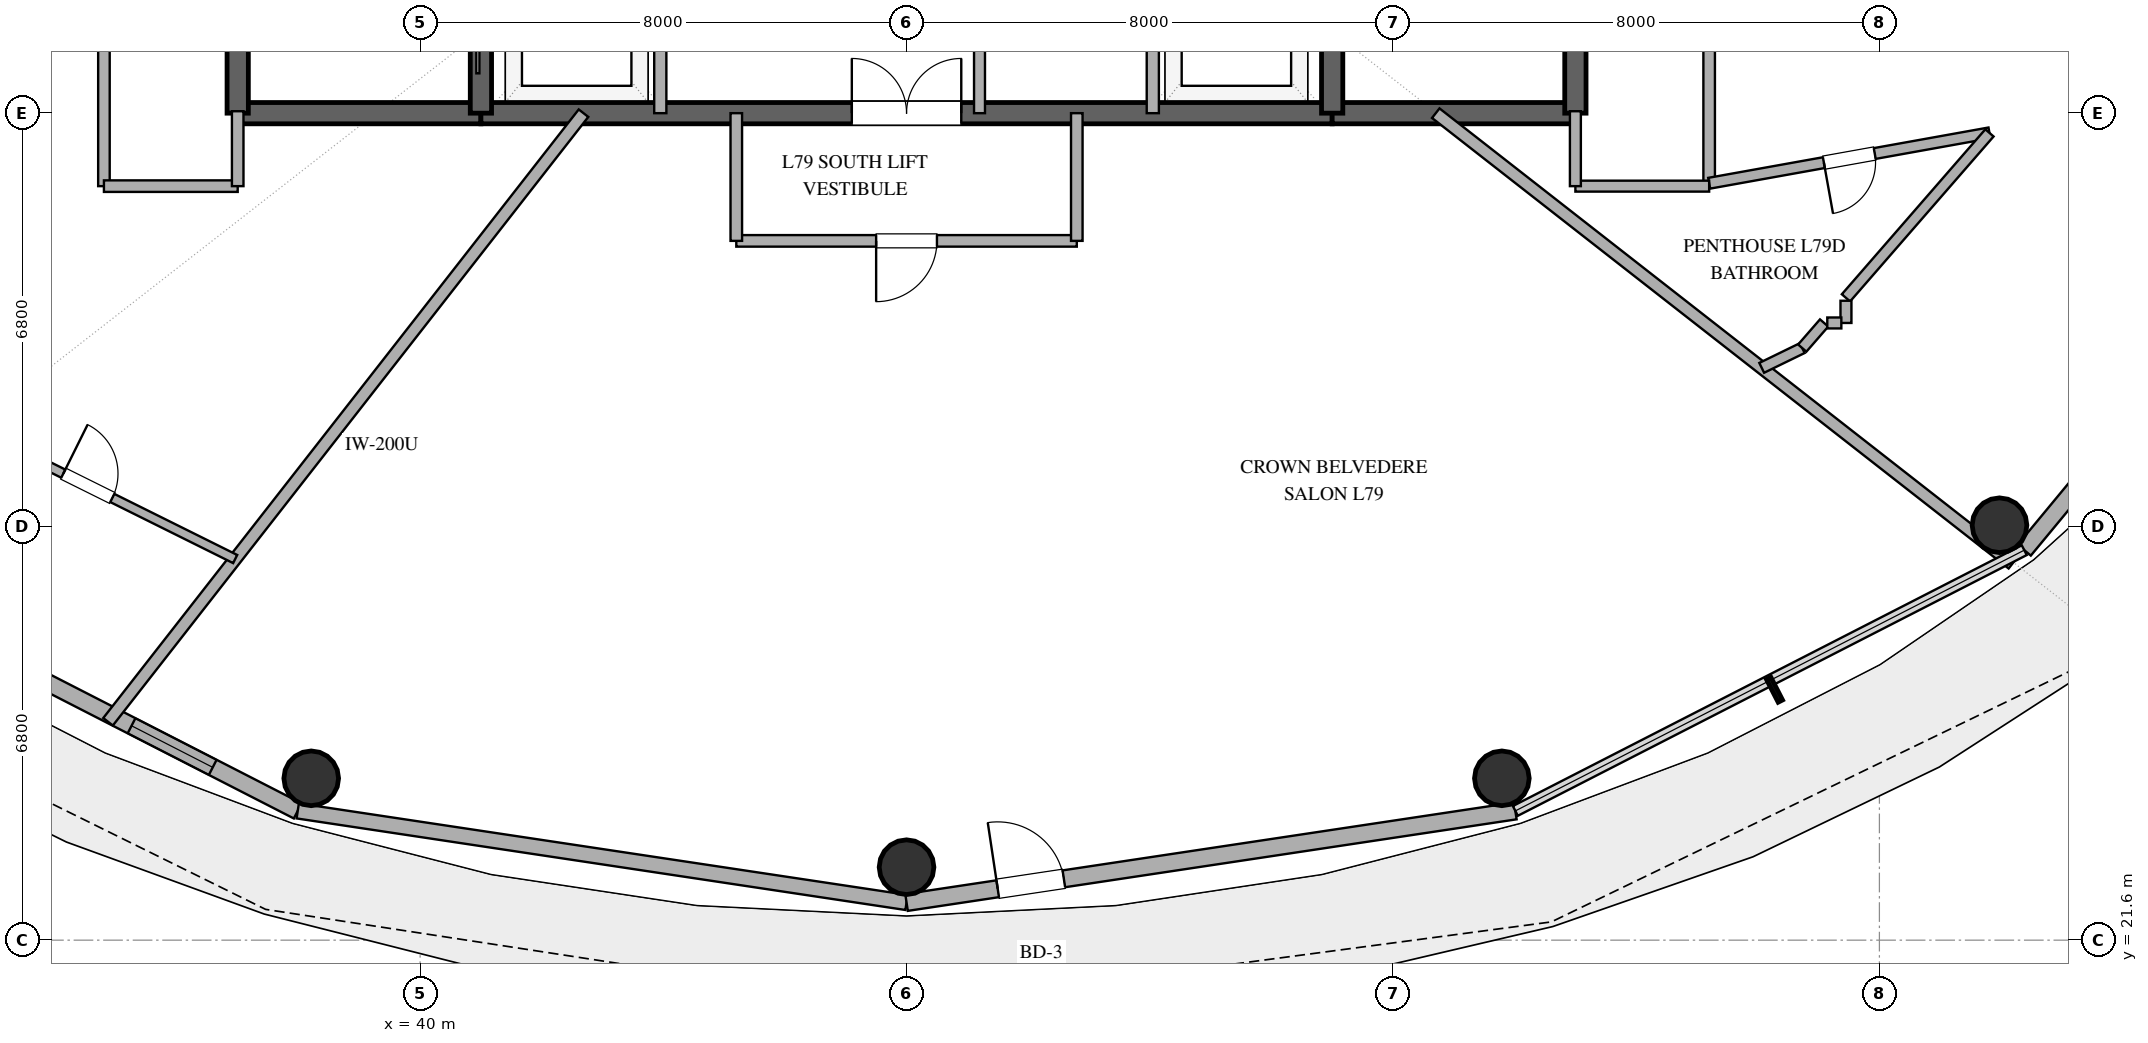
"""IFC4 building model, lengths in metres.
Left out: names, types, materials, properties, quantities, classifications, styles, units other than length and angle.
Written with IfcOpenShell. Run it as: python <this file> out.ifc"""

import sys

from ifc_helpers import new_model, si_unit, direction, frame, frame_2d, origin, origin_2d, place, context, subcontext, project, spatial, rectangle, hollow_circle, extrude, element, fill, save


model = new_model("IFC4")
c1 = context("Model", 3, precision=1e-05, world=origin(), true_north=direction((0.0, 1.0)))
c2 = subcontext(c1, "Body", "Model", "MODEL_VIEW")
j1 = project(units=[si_unit("LENGTHUNIT", "METRE"), si_unit("PLANEANGLEUNIT", "RADIAN")], contexts=[c1])
p1 = place(None, origin())
s1 = spatial("IfcSite", under=j1, at=p1, CompositionType="ELEMENT")
p2 = place(p1, origin())
s2 = spatial("IfcBuilding", under=s1, at=p2, CompositionType="ELEMENT")
p3 = place(p2, frame((0.0, 0.0, 305.4)))
s3 = spatial("IfcBuildingStorey", under=s2, at=p3, CompositionType="ELEMENT", Elevation=305.4)
p4 = place(p3, frame((37.0, 35.2, 0.0), z_axis=(0.0, 0.0, 1.0), x_axis=(1.0, 0.0, 0.0)))
e1 = element("IfcWall", 1, at=p4, inside=s3, PredefinedType="SHEAR", context=c2, shape_type="SweptSolid", body=[
    extrude(rectangle(XDim=4.0, YDim=0.35, at=frame_2d((2.0, 0.0))), origin(), (0.0, 0.0, 1.0), 3.37),
])
p5 = place(p3, frame((41.0, 35.2, 0.0), z_axis=(0.0, 0.0, 1.0), x_axis=(1.0, 0.0, 0.0)))
e2 = element("IfcWall", 2, at=p5, inside=s3, PredefinedType="SHEAR", context=c2, shape_type="SweptSolid", body=[
    extrude(rectangle(XDim=14.0, YDim=0.35, at=frame_2d((7.0, 0.0))), origin(), (0.0, 0.0, 1.0), 3.37),
])
p6 = place(p5, frame((6.1, 0.0, 0.0)))
e3 = element("IfcOpeningElement", 3, at=p6, cuts=e2, PredefinedType="OPENING", context=c2, shape_type="SweptSolid", body=[
    extrude(rectangle(XDim=1.8, YDim=2.25, at=frame_2d((0.9, 1.125))), frame((0.0, 0.185, 0.0), z_axis=(0.0, -1.0, 0.0), x_axis=(1.0, 0.0, 0.0)), (0.0, 0.0, 1.0), 0.37),
])
p7 = place(p3, frame((55.0, 35.2, 0.0), z_axis=(0.0, 0.0, 1.0), x_axis=(1.0, 0.0, 0.0)))
e4 = element("IfcWall", 4, at=p7, inside=s3, PredefinedType="SHEAR", context=c2, shape_type="SweptSolid", body=[
    extrude(rectangle(XDim=4.0, YDim=0.35, at=frame_2d((2.0, 0.0))), origin(), (0.0, 0.0, 1.0), 3.37),
])
p8 = place(p3, frame((37.0, 35.2, 0.0), z_axis=(0.0, 0.0, 1.0), x_axis=(0.0, 1.0, 0.0)))
e5 = element("IfcWall", 5, at=p8, inside=s3, PredefinedType="SHEAR", context=c2, shape_type="SweptSolid", body=[
    extrude(rectangle(XDim=13.6, YDim=0.35, at=frame_2d((6.8, 0.0))), origin(), (0.0, 0.0, 1.0), 3.37),
])
p9 = place(p8, frame((1.5, 0.0, 0.0)))
e6 = element("IfcOpeningElement", 6, at=p9, cuts=e5, PredefinedType="OPENING", context=c2, shape_type="SweptSolid", body=[
    extrude(rectangle(XDim=1.2, YDim=2.15, at=frame_2d((0.6, 1.075))), frame((0.0, 0.185, 0.0), z_axis=(0.0, -1.0, 0.0), x_axis=(1.0, 0.0, 0.0)), (0.0, 0.0, 1.0), 0.37),
])
p10 = place(p3, frame((59.0, 35.2, 0.0), z_axis=(0.0, 0.0, 1.0), x_axis=(0.0, 1.0, 0.0)))
e7 = element("IfcWall", 7, at=p10, inside=s3, PredefinedType="SHEAR", context=c2, shape_type="SweptSolid", body=[
    extrude(rectangle(XDim=13.6, YDim=0.35, at=frame_2d((6.8, 0.0))), origin(), (0.0, 0.0, 1.0), 3.37),
])
p11 = place(p10, frame((1.5, 0.0, 0.0)))
e8 = element("IfcOpeningElement", 8, at=p11, cuts=e7, PredefinedType="OPENING", context=c2, shape_type="SweptSolid", body=[
    extrude(rectangle(XDim=1.2, YDim=2.15, at=frame_2d((0.6, 1.075))), frame((0.0, 0.185, 0.0), z_axis=(0.0, -1.0, 0.0), x_axis=(1.0, 0.0, 0.0)), (0.0, 0.0, 1.0), 0.37),
])
p12 = place(p3, frame((41.0, 35.2, 0.0), z_axis=(0.0, 0.0, 1.0), x_axis=(0.0, 1.0, 0.0)))
e9 = element("IfcWall", 9, at=p12, inside=s3, PredefinedType="SHEAR", context=c2, shape_type="SweptSolid", body=[
    extrude(rectangle(XDim=13.6, YDim=0.35, at=frame_2d((6.8, 0.0))), origin(), (0.0, 0.0, 1.0), 3.37),
])
p13 = place(p12, frame((1.15, 0.0, 0.0)))
e10 = element("IfcOpeningElement", 10, at=p13, cuts=e9, PredefinedType="OPENING", context=c2, shape_type="SweptSolid", body=[
    extrude(rectangle(XDim=1.1, YDim=2.2, at=frame_2d((0.55, 1.1))), frame((0.0, 0.185, 0.0), z_axis=(0.0, -1.0, 0.0), x_axis=(1.0, 0.0, 0.0)), (0.0, 0.0, 1.0), 0.37),
])
p14 = place(p3, frame((55.0, 35.2, 0.0), z_axis=(0.0, 0.0, 1.0), x_axis=(0.0, 1.0, 0.0)))
e11 = element("IfcWall", 11, at=p14, inside=s3, PredefinedType="SHEAR", context=c2, shape_type="SweptSolid", body=[
    extrude(rectangle(XDim=13.6, YDim=0.35, at=frame_2d((6.8, 0.0))), origin(), (0.0, 0.0, 1.0), 3.37),
])
p15 = place(p14, frame((1.15, 0.0, 0.0)))
e12 = element("IfcOpeningElement", 12, at=p15, cuts=e11, PredefinedType="OPENING", context=c2, shape_type="SweptSolid", body=[
    extrude(rectangle(XDim=1.1, YDim=2.2, at=frame_2d((0.55, 1.1))), frame((0.0, 0.185, 0.0), z_axis=(0.0, -1.0, 0.0), x_axis=(1.0, 0.0, 0.0)), (0.0, 0.0, 1.0), 0.37),
])
for number, where, z_axis, x_axis in (
    (13, (38.209, 24.261, 0.0), (0.0, 0.0, 1.0), (1.0, 0.0, 0.0)),
    (14, (48.0, 22.8, 0.0), (0.0, 0.0, 1.0), (1.0, 0.0, 0.0)),
    (15, (57.791, 24.261, 0.0), (0.0, 0.0, 1.0), (1.0, 0.0, 0.0)),
    (16, (65.975, 28.424, 0.0), (0.0, 0.0, 1.0), (1.0, 0.0, 0.0)),
):
    element("IfcColumn", number, at=place(p3, frame(where, z_axis=z_axis, x_axis=x_axis)), inside=s3, PredefinedType="COLUMN", context=c2, shape_type="SweptSolid", body=[
        extrude(hollow_circle(Radius=0.45, WallThickness=0.025, at=origin_2d()), origin(), (0.0, 0.0, 1.0), 3.37),
    ])
p16 = place(p3, frame((29.617, 28.013, 0.0), z_axis=(0.0, 0.0, 1.0), x_axis=(0.890007394051, -0.455946091699, 0.0)))
e17 = element("IfcWall", 17, at=p16, inside=s3, PredefinedType="SOLIDWALL", context=c2, shape_type="SweptSolid", body=[
    extrude(rectangle(XDim=9.404, YDim=0.28, at=frame_2d((4.702, 0.0))), origin(), (0.0, 0.0, 1.0), 3.37),
])
p17 = place(p16, frame((2.817, 0.0, 0.85)))
e18 = element("IfcOpeningElement", 18, at=p17, cuts=e17, PredefinedType="OPENING", context=c2, shape_type="SweptSolid", body=[
    extrude(rectangle(XDim=1.65, YDim=2.0, at=frame_2d((0.825, 1.0))), frame((0.0, 0.15, 0.0), z_axis=(0.0, -1.0, 0.0), x_axis=(1.0, 0.0, 0.0)), (0.0, 0.0, 1.0), 0.3),
])
p18 = place(p16, frame((6.333, 0.0, 0.85)))
e19 = element("IfcOpeningElement", 19, at=p18, cuts=e17, PredefinedType="OPENING", context=c2, shape_type="SweptSolid", body=[
    extrude(rectangle(XDim=1.5, YDim=2.0, at=frame_2d((0.75, 1.0))), frame((0.0, 0.15, 0.0), z_axis=(0.0, -1.0, 0.0), x_axis=(1.0, 0.0, 0.0)), (0.0, 0.0, 1.0), 0.3),
])
p19 = place(p3, frame((37.987, 23.726, 0.0), z_axis=(0.0, 0.0, 1.0), x_axis=(0.988882522213, -0.148698881169, 0.0)))
e20 = element("IfcWall", 20, at=p19, inside=s3, PredefinedType="SOLIDWALL", context=c2, shape_type="SweptSolid", body=[
    extrude(rectangle(XDim=10.125, YDim=0.25, at=frame_2d((5.062, 0.0))), origin(), (0.0, 0.0, 1.0), 3.37),
])
p20 = place(p3, frame((48.0, 22.22, 0.0), z_axis=(0.0, 0.0, 1.0), x_axis=(0.988882522213, 0.148698881169, 0.0)))
e21 = element("IfcWall", 21, at=p20, inside=s3, PredefinedType="SOLIDWALL", context=c2, shape_type="SweptSolid", body=[
    extrude(rectangle(XDim=10.125, YDim=0.28, at=frame_2d((5.062, 0.0))), origin(), (0.0, 0.0, 1.0), 3.37),
])
p21 = place(p20, frame((1.516, 0.0, 0.0)))
e22 = element("IfcOpeningElement", 22, at=p21, cuts=e21, PredefinedType="OPENING", context=c2, shape_type="SweptSolid", body=[
    extrude(rectangle(XDim=1.1, YDim=2.25, at=frame_2d((0.55, 1.125))), frame((0.0, 0.15, 0.0), z_axis=(0.0, -1.0, 0.0), x_axis=(1.0, 0.0, 0.0)), (0.0, 0.0, 1.0), 0.3),
])
p22 = place(p3, frame((66.383, 28.013, 0.0), z_axis=(0.0, 0.0, 1.0), x_axis=(0.63761509934, 0.770355103243, 0.0)))
e23 = element("IfcWall", 23, at=p22, inside=s3, PredefinedType="SOLIDWALL", context=c2, shape_type="SweptSolid", body=[
    extrude(rectangle(XDim=8.33, YDim=0.28, at=frame_2d((4.165, 0.0))), origin(), (0.0, 0.0, 1.0), 3.37),
])
p23 = place(p22, frame((2.426, 0.0, 0.85)))
e24 = element("IfcOpeningElement", 24, at=p23, cuts=e23, PredefinedType="OPENING", context=c2, shape_type="SweptSolid", body=[
    extrude(rectangle(XDim=1.2, YDim=1.8, at=frame_2d((0.6, 0.9))), frame((0.0, 0.15, 0.0), z_axis=(0.0, -1.0, 0.0), x_axis=(1.0, 0.0, 0.0)), (0.0, 0.0, 1.0), 0.3),
])
p24 = place(p22, frame((4.596, 0.0, 0.85)))
e25 = element("IfcOpeningElement", 25, at=p24, cuts=e23, PredefinedType="OPENING", context=c2, shape_type="SweptSolid", body=[
    extrude(rectangle(XDim=1.2, YDim=1.8, at=frame_2d((0.6, 0.9))), frame((0.0, 0.15, 0.0), z_axis=(0.0, -1.0, 0.0), x_axis=(1.0, 0.0, 0.0)), (0.0, 0.0, 1.0), 0.3),
])
for number, where, z_axis, x_axis in (
    (26, (43.95, 35.2, 0.0), (0.0, 0.0, 1.0), (0.0, 1.0, 0.0)),
    (27, (52.05, 35.2, 0.0), (0.0, 0.0, 1.0), (0.0, 1.0, 0.0)),
):
    element("IfcWall", number, at=place(p3, frame(where, z_axis=z_axis, x_axis=x_axis)), inside=s3, PredefinedType="SOLIDWALL", context=c2, shape_type="SweptSolid", body=[
        extrude(rectangle(XDim=3.2, YDim=0.2, at=frame_2d((1.6, 0.0))), origin(), (0.0, 0.0, 1.0), 2.73),
    ])
p25 = place(p3, frame((49.2, 35.2, 0.0), z_axis=(0.0, 0.0, 1.0), x_axis=(0.0, 1.0, 0.0)))
e28 = element("IfcWall", 28, at=p25, inside=s3, PredefinedType="PLUMBINGWALL", context=c2, shape_type="SweptSolid", body=[
    extrude(rectangle(XDim=3.2, YDim=0.18, at=frame_2d((1.6, 0.0))), origin(), (0.0, 0.0, 1.0), 2.73),
])
p26 = place(p25, frame((1.15, 0.0, 0.0)))
e29 = element("IfcOpeningElement", 29, at=p26, cuts=e28, PredefinedType="OPENING", context=c2, shape_type="SweptSolid", body=[
    extrude(rectangle(XDim=0.9, YDim=2.1, at=frame_2d((0.45, 1.05))), frame((0.0, 0.1, 0.0), z_axis=(0.0, -1.0, 0.0), x_axis=(1.0, 0.0, 0.0)), (0.0, 0.0, 1.0), 0.2),
])
p27 = place(p3, frame((61.2, 50.9, 0.0), z_axis=(0.0, 0.0, 1.0), x_axis=(0.0, -1.0, 0.0)))
e30 = element("IfcWall", 30, at=p27, inside=s3, PredefinedType="PARTITIONING", context=c2, shape_type="SweptSolid", body=[
    extrude(rectangle(XDim=16.885, YDim=0.19, at=frame_2d((8.442, 0.0))), origin(), (0.0, 0.0, 1.0), 2.73),
])
p28 = place(p27, frame((7.942, 0.0, 0.0)))
e31 = element("IfcOpeningElement", 31, at=p28, cuts=e30, PredefinedType="OPENING", context=c2, shape_type="SweptSolid", body=[
    extrude(rectangle(XDim=1.0, YDim=2.2, at=frame_2d((0.5, 1.1))), frame((0.0, 0.105, 0.0), z_axis=(0.0, -1.0, 0.0), x_axis=(1.0, 0.0, 0.0)), (0.0, 0.0, 1.0), 0.21),
])
p29 = place(p3, frame((42.687, 35.2, 0.0), z_axis=(0.0, 0.0, 1.0), x_axis=(-0.615663811723, -0.788008928208, 0.0)))
e32 = element("IfcWall", 32, at=p29, inside=s3, PredefinedType="PARTITIONING", context=c2, shape_type="SweptSolid", body=[
    extrude(rectangle(XDim=12.701, YDim=0.2, at=frame_2d((6.351, 0.0))), origin(), (0.0, 0.0, 1.0), 2.73),
])
p30 = place(p3, frame((56.704, 35.2, 0.0), z_axis=(0.0, 0.0, 1.0), x_axis=(0.78802314347, -0.615645616695, 0.0)))
e33 = element("IfcWall", 33, at=p30, inside=s3, PredefinedType="PARTITIONING", context=c2, shape_type="SweptSolid", body=[
    extrude(rectangle(XDim=12.034, YDim=0.2, at=frame_2d((6.017, 0.0))), origin(), (0.0, 0.0, 1.0), 2.73),
])
p31 = place(p3, frame((50.8, 33.1, 0.0), z_axis=(0.0, 0.0, 1.0), x_axis=(-1.0, 0.0, 0.0)))
e34 = element("IfcWall", 34, at=p31, inside=s3, PredefinedType="PARTITIONING", context=c2, shape_type="SweptSolid", body=[
    extrude(rectangle(XDim=5.6, YDim=0.19, at=frame_2d((2.8, 0.0))), origin(), (0.0, 0.0, 1.0), 2.73),
])
p32 = place(p31, frame((2.3, 0.0, 0.0)))
e35 = element("IfcOpeningElement", 35, at=p32, cuts=e34, PredefinedType="OPENING", context=c2, shape_type="SweptSolid", body=[
    extrude(rectangle(XDim=1.0, YDim=2.2, at=frame_2d((0.5, 1.1))), frame((0.0, 0.105, 0.0), z_axis=(0.0, -1.0, 0.0), x_axis=(1.0, 0.0, 0.0)), (0.0, 0.0, 1.0), 0.21),
])
p33 = place(p3, frame((32.11, 30.276, 0.0), z_axis=(0.0, 0.0, 1.0), x_axis=(0.895587674753, -0.444885060247, 0.0)))
e36 = element("IfcWall", 36, at=p33, inside=s3, PredefinedType="PARTITIONING", context=c2, shape_type="SweptSolid", body=[
    extrude(rectangle(XDim=5.414, YDim=0.15, at=frame_2d((2.707, 0.0))), origin(), (0.0, 0.0, 1.0), 2.73),
])
p34 = place(p33, frame((2.257, 0.0, 0.0)))
e37 = element("IfcOpeningElement", 37, at=p34, cuts=e36, PredefinedType="OPENING", context=c2, shape_type="SweptSolid", body=[
    extrude(rectangle(XDim=0.9, YDim=2.1, at=frame_2d((0.45, 1.05))), frame((0.0, 0.085, 0.0), z_axis=(0.0, -1.0, 0.0), x_axis=(1.0, 0.0, 0.0)), (0.0, 0.0, 1.0), 0.17),
])
p35 = place(p3, frame((65.81, 34.875, 0.0), z_axis=(0.0, 0.0, 1.0), x_axis=(-0.984255399889, -0.1767521083, 0.0)))
e38 = element("IfcWall", 38, at=p35, inside=s3, PredefinedType="PLUMBINGWALL", context=c2, shape_type="SweptSolid", body=[
    extrude(rectangle(XDim=4.684, YDim=0.18, at=frame_2d((2.342, 0.0))), origin(), (0.0, 0.0, 1.0), 2.73),
])
p36 = place(p35, frame((1.917, 0.0, 0.0)))
e39 = element("IfcOpeningElement", 39, at=p36, cuts=e38, PredefinedType="OPENING", context=c2, shape_type="SweptSolid", body=[
    extrude(rectangle(XDim=0.85, YDim=2.1, at=frame_2d((0.425, 1.05))), frame((0.0, 0.1, 0.0), z_axis=(0.0, -1.0, 0.0), x_axis=(1.0, 0.0, 0.0)), (0.0, 0.0, 1.0), 0.2),
])
p37 = place(p3, frame((34.8, 34.0, 0.0), z_axis=(0.0, 0.0, 1.0), x_axis=(0.0, 1.0, 0.0)))
e40 = element("IfcWall", 40, at=p37, inside=s3, PredefinedType="PARTITIONING", context=c2, shape_type="SweptSolid", body=[
    extrude(rectangle(XDim=3.728, YDim=0.19, at=frame_2d((1.864, 0.0))), origin(), (0.0, 0.0, 1.0), 2.73),
])
p38 = place(p3, frame((63.45, 32.163, 0.0), z_axis=(0.0, 0.0, 1.0), x_axis=(0.656415720833, 0.754399364689, 0.0)))
e41 = element("IfcWall", 41, at=p38, inside=s3, PredefinedType="PLUMBINGWALL", context=c2, shape_type="SweptSolid", body=[
    extrude(rectangle(XDim=3.595, YDim=0.18, at=frame_2d((1.798, 0.0))), origin(), (0.0, 0.0, 1.0), 2.73),
])
p39 = place(p3, frame((37.0, 34.0, 0.0), z_axis=(0.0, 0.0, 1.0), x_axis=(-1.0, 0.0, 0.0)))
e42 = element("IfcWall", 42, at=p39, inside=s3, PredefinedType="PARTITIONING", context=c2, shape_type="SweptSolid", body=[
    extrude(rectangle(XDim=2.2, YDim=0.19, at=frame_2d((1.1, 0.0))), origin(), (0.0, 0.0, 1.0), 2.73),
])
p40 = place(p3, frame((61.2, 34.0, 0.0), z_axis=(0.0, 0.0, 1.0), x_axis=(-1.0, 0.0, 0.0)))
e43 = element("IfcWall", 43, at=p40, inside=s3, PredefinedType="PLUMBINGWALL", context=c2, shape_type="SweptSolid", body=[
    extrude(rectangle(XDim=2.2, YDim=0.18, at=frame_2d((1.1, 0.0))), origin(), (0.0, 0.0, 1.0), 2.73),
])
for number, where, z_axis, x_axis in (
    (44, (50.8, 35.2, 0.0), (0.0, 0.0, 1.0), (0.0, -1.0, 0.0)),
    (45, (45.2, 33.1, 0.0), (0.0, 0.0, 1.0), (0.0, 1.0, 0.0)),
):
    element("IfcWall", number, at=place(p3, frame(where, z_axis=z_axis, x_axis=x_axis)), inside=s3, PredefinedType="PARTITIONING", context=c2, shape_type="SweptSolid", body=[
        extrude(rectangle(XDim=2.1, YDim=0.19, at=frame_2d((1.05, 0.0))), origin(), (0.0, 0.0, 1.0), 2.73),
    ])
p41 = place(p3, frame((37.0, 35.232, 0.0), z_axis=(0.0, 0.0, 1.0), x_axis=(0.0, -1.0, 0.0)))
e46 = element("IfcWall", 46, at=p41, inside=s3, PredefinedType="PARTITIONING", context=c2, shape_type="SweptSolid", body=[
    extrude(rectangle(XDim=1.232, YDim=0.19, at=frame_2d((0.616, 0.0))), origin(), (0.0, 0.0, 1.0), 2.73),
])
p42 = place(p3, frame((59.0, 34.0, 0.0), z_axis=(0.0, 0.0, 1.0), x_axis=(0.0, 1.0, 0.0)))
e47 = element("IfcWall", 47, at=p42, inside=s3, PredefinedType="PLUMBINGWALL", context=c2, shape_type="SweptSolid", body=[
    extrude(rectangle(XDim=1.232, YDim=0.18, at=frame_2d((0.616, 0.0))), origin(), (0.0, 0.0, 1.0), 2.73),
])
p43 = place(p3, frame((62.064, 31.012, 0.0), z_axis=(0.0, 0.0, 1.0), x_axis=(0.898856964529, 0.438242121798, 0.0)))
e48 = element("IfcWall", 48, at=p43, inside=s3, PredefinedType="PLUMBINGWALL", context=c2, shape_type="SweptSolid", body=[
    extrude(rectangle(XDim=0.742, YDim=0.18, at=frame_2d((0.371, 0.0))), origin(), (0.0, 0.0, 1.0), 2.73),
])
p44 = place(p3, frame((62.731, 31.337, 0.0), z_axis=(0.0, 0.0, 1.0), x_axis=(0.656609016673, 0.754231131168, 0.0)))
e49 = element("IfcWall", 49, at=p44, inside=s3, PredefinedType="PLUMBINGWALL", context=c2, shape_type="SweptSolid", body=[
    extrude(rectangle(XDim=0.548, YDim=0.18, at=frame_2d((0.274, 0.0))), origin(), (0.0, 0.0, 1.0), 2.73),
])
p45 = place(p3, frame((63.45, 31.75, 0.0), z_axis=(0.0, 0.0, 1.0), x_axis=(0.0, 1.0, 0.0)))
e50 = element("IfcWall", 50, at=p45, inside=s3, PredefinedType="PLUMBINGWALL", context=c2, shape_type="SweptSolid", body=[
    extrude(rectangle(XDim=0.365, YDim=0.18, at=frame_2d((0.183, 0.0))), origin(), (0.0, 0.0, 1.0), 2.73),
])
p46 = place(p3, frame((63.143, 31.75, 0.0), z_axis=(0.0, 0.0, 1.0), x_axis=(1.0, 0.0, 0.0)))
e51 = element("IfcWall", 51, at=p46, inside=s3, PredefinedType="PLUMBINGWALL", context=c2, shape_type="SweptSolid", body=[
    extrude(rectangle(XDim=0.231, YDim=0.18, at=frame_2d((0.116, 0.0))), origin(), (0.0, 0.0, 1.0), 2.73),
])
p47 = place(p18, origin())
e52 = element("IfcWindow", 52, at=p47, inside=s3, PartitioningType="SINGLE_PANEL", PredefinedType="WINDOW", context=c2, shape_type="SweptSolid", body=[
    extrude(rectangle(XDim=1.5, YDim=2.0, at=frame_2d((0.75, 1.0))), frame((0.0, 0.03, 0.0), z_axis=(0.0, -1.0, 0.0), x_axis=(1.0, 0.0, 0.0)), (0.0, 0.0, 1.0), 0.06),
])
fill(e19, e52)
p48 = place(p21, origin())
e53 = element("IfcDoor", 53, at=p48, inside=s3, OperationType="SINGLE_SWING_LEFT", PredefinedType="DOOR", context=c2, shape_type="SweptSolid", body=[
    extrude(rectangle(XDim=1.1, YDim=2.25, at=frame_2d((0.55, 1.125))), frame((0.0, 0.025, 0.0), z_axis=(0.0, -1.0, 0.0), x_axis=(1.0, 0.0, 0.0)), (0.0, 0.0, 1.0), 0.05),
])
fill(e22, e53)
p49 = place(p6, origin())
e54 = element("IfcDoor", 54, at=p49, inside=s3, OperationType="DOUBLE_DOOR_SINGLE_SWING", PredefinedType="DOOR", context=c2, shape_type="SweptSolid", body=[
    extrude(rectangle(XDim=1.8, YDim=2.25, at=frame_2d((0.9, 1.125))), frame((0.0, 0.025, 0.0), z_axis=(0.0, -1.0, 0.0), x_axis=(1.0, 0.0, 0.0)), (0.0, 0.0, 1.0), 0.05),
])
fill(e3, e54)
p50 = place(p32, origin())
e55 = element("IfcDoor", 55, at=p50, inside=s3, OperationType="SINGLE_SWING_RIGHT", PredefinedType="DOOR", context=c2, shape_type="SweptSolid", body=[
    extrude(rectangle(XDim=1.0, YDim=2.2, at=frame_2d((0.5, 1.1))), frame((0.0, 0.025, 0.0), z_axis=(0.0, -1.0, 0.0), x_axis=(1.0, 0.0, 0.0)), (0.0, 0.0, 1.0), 0.05),
])
fill(e35, e55)
p51 = place(p34, origin())
e56 = element("IfcDoor", 56, at=p51, inside=s3, OperationType="SINGLE_SWING_LEFT", PredefinedType="DOOR", context=c2, shape_type="SweptSolid", body=[
    extrude(rectangle(XDim=0.9, YDim=2.1, at=frame_2d((0.45, 1.05))), frame((0.0, 0.025, 0.0), z_axis=(0.0, -1.0, 0.0), x_axis=(1.0, 0.0, 0.0)), (0.0, 0.0, 1.0), 0.05),
])
fill(e37, e56)
p52 = place(p36, origin())
e57 = element("IfcDoor", 57, at=p52, inside=s3, OperationType="SINGLE_SWING_RIGHT", PredefinedType="DOOR", context=c2, shape_type="SweptSolid", body=[
    extrude(rectangle(XDim=0.85, YDim=2.1, at=frame_2d((0.425, 1.05))), frame((0.0, 0.025, 0.0), z_axis=(0.0, -1.0, 0.0), x_axis=(1.0, 0.0, 0.0)), (0.0, 0.0, 1.0), 0.05),
])
fill(e39, e57)
save(model, sys.argv[1])
